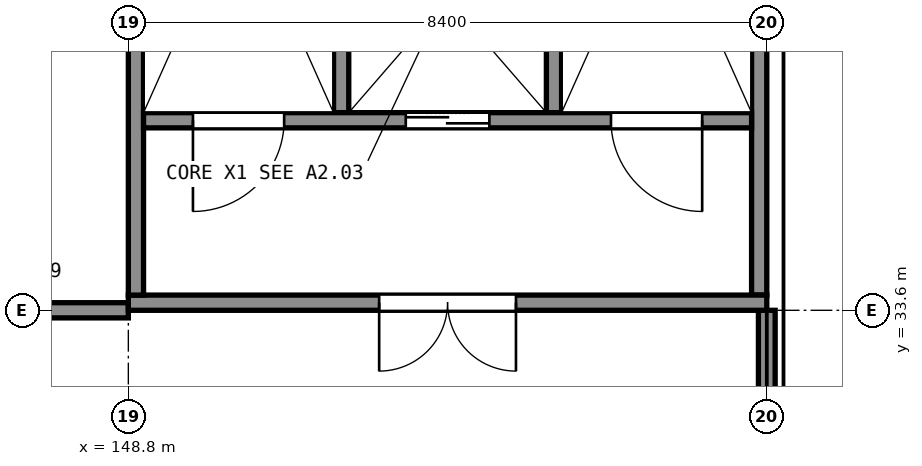
"""IFC4 building model, lengths in metres.
Left out: names, types, materials, properties, quantities, classifications, styles, units other than length and angle.
Written with IfcOpenShell. Run it as: python <this file> out.ifc"""

import sys

from ifc_helpers import new_model, si_unit, direction, frame, frame_2d, origin, place, context, subcontext, project, spatial, rectangle, extrude, element, fill, save


model = new_model("IFC4")
c1 = context("Model", 3, precision=1e-05, world=origin(), true_north=direction((0.0, 1.0)))
c2 = subcontext(c1, "Body", "Model", "MODEL_VIEW")
j1 = project(units=[si_unit("LENGTHUNIT", "METRE"), si_unit("PLANEANGLEUNIT", "RADIAN")], contexts=[c1])
p1 = place(None, origin())
s1 = spatial("IfcSite", under=j1, at=p1, CompositionType="ELEMENT")
p2 = place(p1, origin())
s2 = spatial("IfcBuilding", under=s1, at=p2, CompositionType="ELEMENT")
p3 = place(p2, frame((0.0, 0.0, 5.5)))
s3 = spatial("IfcBuildingStorey", under=s2, at=p3, CompositionType="ELEMENT", Elevation=5.5)
p4 = place(p3, frame((148.8, 33.7, 0.0), z_axis=(0.0, 0.0, 1.0), x_axis=(1.0, 0.0, 0.0)))
e1 = element("IfcWall", 1, at=p4, inside=s3, PredefinedType="SHEAR", context=c2, shape_type="SweptSolid", body=[
    extrude(rectangle(XDim=8.4, YDim=0.2, at=frame_2d((4.2, 0.0))), origin(), (0.0, 0.0, 1.0), 5.0),
])
p5 = place(p4, frame((3.3, 0.0, 0.0)))
e2 = element("IfcOpeningElement", 2, at=p5, cuts=e1, PredefinedType="OPENING", context=c2, shape_type="SweptSolid", body=[
    extrude(rectangle(XDim=1.8, YDim=2.1, at=frame_2d((0.9, 1.05))), frame((0.0, 0.11, 0.0), z_axis=(0.0, -1.0, 0.0), x_axis=(1.0, 0.0, 0.0)), (0.0, 0.0, 1.0), 0.22),
])
for number, where, z_axis, x_axis in (
    (3, (148.9, 33.8, 0.0), (0.0, 0.0, 1.0), (0.0, 1.0, 0.0)),
    (4, (157.1, 33.8, 0.0), (0.0, 0.0, 1.0), (0.0, 1.0, 0.0)),
):
    element("IfcWall", number, at=place(p3, frame(where, z_axis=z_axis, x_axis=x_axis)), inside=s3, PredefinedType="SHEAR", context=c2, shape_type="SweptSolid", body=[
        extrude(rectangle(XDim=8.0, YDim=0.2, at=frame_2d((4.0, 0.0))), origin(), (0.0, 0.0, 1.0), 5.0),
    ])
p6 = place(p3, frame((149.0, 36.1, 0.0), z_axis=(0.0, 0.0, 1.0), x_axis=(1.0, 0.0, 0.0)))
e5 = element("IfcWall", 5, at=p6, inside=s3, PredefinedType="SHEAR", context=c2, shape_type="SweptSolid", body=[
    extrude(rectangle(XDim=8.0, YDim=0.2, at=frame_2d((4.0, 0.0))), origin(), (0.0, 0.0, 1.0), 5.0),
])
p7 = place(p6, frame((0.65, 0.0, 0.0)))
e6 = element("IfcOpeningElement", 6, at=p7, cuts=e5, PredefinedType="OPENING", context=c2, shape_type="SweptSolid", body=[
    extrude(rectangle(XDim=1.2, YDim=2.1, at=frame_2d((0.6, 1.05))), frame((0.0, 0.11, 0.0), z_axis=(0.0, -1.0, 0.0), x_axis=(1.0, 0.0, 0.0)), (0.0, 0.0, 1.0), 0.22),
])
p8 = place(p6, frame((6.15, 0.0, 0.0)))
e7 = element("IfcOpeningElement", 7, at=p8, cuts=e5, PredefinedType="OPENING", context=c2, shape_type="SweptSolid", body=[
    extrude(rectangle(XDim=1.2, YDim=2.1, at=frame_2d((0.6, 1.05))), frame((0.0, 0.11, 0.0), z_axis=(0.0, -1.0, 0.0), x_axis=(1.0, 0.0, 0.0)), (0.0, 0.0, 1.0), 0.22),
])
p9 = place(p6, frame((3.45, 0.0, 0.0)))
e8 = element("IfcOpeningElement", 8, at=p9, cuts=e5, PredefinedType="OPENING", context=c2, shape_type="SweptSolid", body=[
    extrude(rectangle(XDim=1.1, YDim=2.1, at=frame_2d((0.55, 1.05))), frame((0.0, 0.11, 0.0), z_axis=(0.0, -1.0, 0.0), x_axis=(1.0, 0.0, 0.0)), (0.0, 0.0, 1.0), 0.22),
])
for number, where, z_axis, x_axis in (
    (9, (151.6, 36.2, 0.0), (0.0, 0.0, 1.0), (0.0, 1.0, 0.0)),
    (10, (154.4, 36.2, 0.0), (0.0, 0.0, 1.0), (0.0, 1.0, 0.0)),
):
    element("IfcWall", number, at=place(p3, frame(where, z_axis=z_axis, x_axis=x_axis)), inside=s3, PredefinedType="SHEAR", context=c2, shape_type="SweptSolid", body=[
        extrude(rectangle(XDim=5.6, YDim=0.2, at=frame_2d((2.8, 0.0))), origin(), (0.0, 0.0, 1.0), 5.0),
    ])
p10 = place(p3, frame((157.2, 25.6, 0.0), z_axis=(0.0, 0.0, 1.0), x_axis=(0.0, 1.0, 0.0)))
e11 = element("IfcWall", 11, at=p10, inside=s3, PredefinedType="SOLIDWALL", context=c2, shape_type="SweptSolid", body=[
    extrude(rectangle(XDim=8.0, YDim=0.22, at=frame_2d((4.0, 0.0))), origin(), (0.0, 0.0, 1.0), 3.94),
])
p11 = place(p3, frame((144.5, 33.6, 0.0), z_axis=(0.0, 0.0, 1.0), x_axis=(1.0, 0.0, 0.0)))
e12 = element("IfcWall", 12, at=p11, inside=s3, PredefinedType="PARTITIONING", context=c2, shape_type="SweptSolid", body=[
    extrude(rectangle(XDim=4.3, YDim=0.2, at=frame_2d((2.15, 0.0))), origin(), (0.0, 0.0, 1.0), 3.9),
])
p12 = place(p11, frame((1.75, 0.0, 0.0)))
e13 = element("IfcOpeningElement", 13, at=p12, cuts=e12, PredefinedType="OPENING", context=c2, shape_type="SweptSolid", body=[
    extrude(rectangle(XDim=1.0, YDim=2.1, at=frame_2d((0.5, 1.05))), frame((0.0, 0.11, 0.0), z_axis=(0.0, -1.0, 0.0), x_axis=(1.0, 0.0, 0.0)), (0.0, 0.0, 1.0), 0.22),
])
p13 = place(p5, origin())
e14 = element("IfcDoor", 14, at=p13, inside=s3, OperationType="DOUBLE_DOOR_SINGLE_SWING", PredefinedType="DOOR", context=c2, shape_type="SweptSolid", body=[
    extrude(rectangle(XDim=1.8, YDim=2.1, at=frame_2d((0.9, 1.05))), frame((0.0, 0.025, 0.0), z_axis=(0.0, -1.0, 0.0), x_axis=(1.0, 0.0, 0.0)), (0.0, 0.0, 1.0), 0.05),
])
fill(e2, e14)
p14 = place(p7, origin())
e15 = element("IfcDoor", 15, at=p14, inside=s3, OperationType="SINGLE_SWING_LEFT", PredefinedType="DOOR", context=c2, shape_type="SweptSolid", body=[
    extrude(rectangle(XDim=1.2, YDim=2.1, at=frame_2d((0.6, 1.05))), frame((0.0, 0.025, 0.0), z_axis=(0.0, -1.0, 0.0), x_axis=(1.0, 0.0, 0.0)), (0.0, 0.0, 1.0), 0.05),
])
fill(e6, e15)
p15 = place(p8, origin())
e16 = element("IfcDoor", 16, at=p15, inside=s3, OperationType="SINGLE_SWING_RIGHT", PredefinedType="DOOR", context=c2, shape_type="SweptSolid", body=[
    extrude(rectangle(XDim=1.2, YDim=2.1, at=frame_2d((0.6, 1.05))), frame((0.0, 0.025, 0.0), z_axis=(0.0, -1.0, 0.0), x_axis=(1.0, 0.0, 0.0)), (0.0, 0.0, 1.0), 0.05),
])
fill(e7, e16)
p16 = place(p9, origin())
e17 = element("IfcDoor", 17, at=p16, inside=s3, OperationType="DOUBLE_DOOR_SLIDING", PredefinedType="DOOR", context=c2, shape_type="SweptSolid", body=[
    extrude(rectangle(XDim=1.1, YDim=2.1, at=frame_2d((0.55, 1.05))), frame((0.0, 0.025, 0.0), z_axis=(0.0, -1.0, 0.0), x_axis=(1.0, 0.0, 0.0)), (0.0, 0.0, 1.0), 0.05),
])
fill(e8, e17)
save(model, sys.argv[1])
